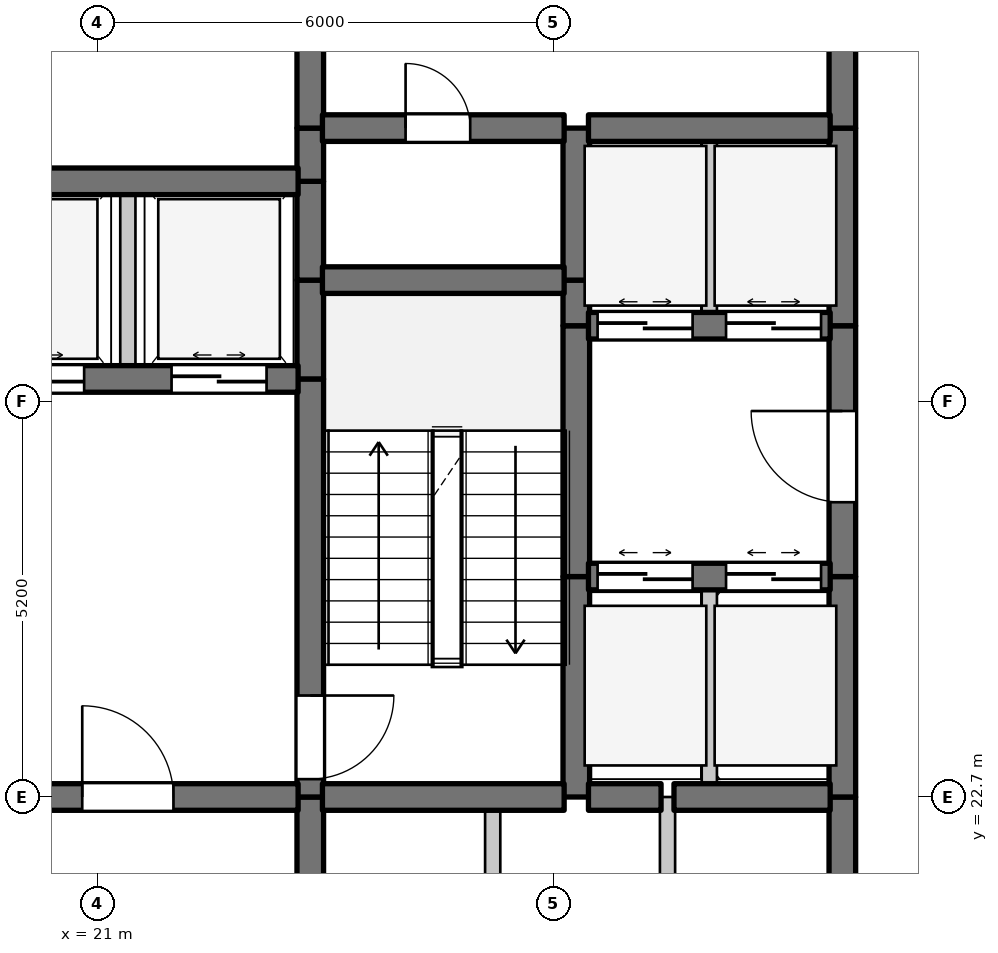
"""IFC4 building model, lengths in metres.
Left out: names, types, materials, properties, quantities, classifications, styles, units other than length and angle.
Written with IfcOpenShell. Run it as: python <this file> out.ifc"""

import sys

from ifc_helpers import new_model, si_unit, direction, frame, frame_2d, origin, place, context, subcontext, project, spatial, rectangle, extrude, element, fill, save


model = new_model("IFC4")
c1 = context("Model", 3, precision=1e-05, world=origin(), true_north=direction((0.0, 1.0)))
c2 = subcontext(c1, "Body", "Model", "MODEL_VIEW")
j1 = project(units=[si_unit("LENGTHUNIT", "METRE"), si_unit("PLANEANGLEUNIT", "RADIAN")], contexts=[c1])
p1 = place(None, origin())
s1 = spatial("IfcSite", under=j1, at=p1, CompositionType="ELEMENT")
p2 = place(p1, origin())
s2 = spatial("IfcBuilding", under=s1, at=p2, CompositionType="ELEMENT")
p3 = place(p2, frame((0.0, 0.0, 86.4)))
s3 = spatial("IfcBuildingStorey", under=s2, at=p3, CompositionType="ELEMENT", Elevation=86.4)
p4 = place(p3, frame((21.4, 28.2, 0.0), z_axis=(0.0, 0.0, 1.0), x_axis=(0.0, 1.0, 0.0)))
e1 = element("IfcWall", 1, at=p4, inside=s3, PredefinedType="STANDARD", context=c2, shape_type="SweptSolid", body=[
    extrude(rectangle(XDim=2.6, YDim=0.2, at=frame_2d((1.3, 0.0))), origin(), (0.0, 0.0, 1.0), 4.185),
])
p5 = place(p3, frame((23.8, 19.5, 0.0), z_axis=(0.0, 0.0, 1.0), x_axis=(0.0, 1.0, 0.0)))
e2 = element("IfcWall", 2, at=p5, inside=s3, PredefinedType="SHEAR", context=c2, shape_type="SweptSolid", body=[
    extrude(rectangle(XDim=3.2, YDim=0.35, at=frame_2d((1.6, 0.0))), origin(), (0.0, 0.0, 1.0), 4.185),
])
p6 = place(p3, frame((23.8, 22.7, 0.0), z_axis=(0.0, 0.0, 1.0), x_axis=(0.0, 1.0, 0.0)))
e3 = element("IfcWall", 3, at=p6, inside=s3, PredefinedType="SHEAR", context=c2, shape_type="SweptSolid", body=[
    extrude(rectangle(XDim=5.5, YDim=0.35, at=frame_2d((2.75, 0.0))), origin(), (0.0, 0.0, 1.0), 4.185),
])
p7 = place(p6, frame((0.235, 0.0, 0.0)))
e4 = element("IfcOpeningElement", 4, at=p7, cuts=e3, PredefinedType="OPENING", context=c2, shape_type="SweptSolid", body=[
    extrude(rectangle(XDim=1.1, YDim=2.15, at=frame_2d((0.55, 1.075))), frame((0.0, 0.185, 0.0), z_axis=(0.0, -1.0, 0.0), x_axis=(1.0, 0.0, 0.0)), (0.0, 0.0, 1.0), 0.37),
])
for number, where, z_axis, x_axis in (
    (5, (23.8, 28.2, 0.0), (0.0, 0.0, 1.0), (0.0, 1.0, 0.0)),
    (6, (23.8, 29.5, 0.0), (0.0, 0.0, 1.0), (0.0, 1.0, 0.0)),
):
    element("IfcWall", number, at=place(p3, frame(where, z_axis=z_axis, x_axis=x_axis)), inside=s3, PredefinedType="SHEAR", context=c2, shape_type="SweptSolid", body=[
        extrude(rectangle(XDim=1.3, YDim=0.35, at=frame_2d((0.65, 0.0))), origin(), (0.0, 0.0, 1.0), 4.185),
    ])
p8 = place(p3, frame((23.8, 30.8, 0.0), z_axis=(0.0, 0.0, 1.0), x_axis=(0.0, 1.0, 0.0)))
e7 = element("IfcWall", 7, at=p8, inside=s3, PredefinedType="SHEAR", context=c2, shape_type="SweptSolid", body=[
    extrude(rectangle(XDim=0.7, YDim=0.35, at=frame_2d((0.35, 0.0))), origin(), (0.0, 0.0, 1.0), 4.185),
])
p9 = place(p3, frame((23.8, 31.5, 0.0), z_axis=(0.0, 0.0, 1.0), x_axis=(0.0, 1.0, 0.0)))
e8 = element("IfcWall", 8, at=p9, inside=s3, PredefinedType="SHEAR", context=c2, shape_type="SweptSolid", body=[
    extrude(rectangle(XDim=3.5, YDim=0.35, at=frame_2d((1.75, 0.0))), origin(), (0.0, 0.0, 1.0), 4.185),
])
p10 = place(p9, frame((1.127, 0.0, 0.0)))
e9 = element("IfcOpeningElement", 9, at=p10, cuts=e8, PredefinedType="OPENING", context=c2, shape_type="SweptSolid", body=[
    extrude(rectangle(XDim=1.1, YDim=2.15, at=frame_2d((0.55, 1.075))), frame((0.0, 0.185, 0.0), z_axis=(0.0, -1.0, 0.0), x_axis=(1.0, 0.0, 0.0)), (0.0, 0.0, 1.0), 0.37),
])
p11 = place(p3, frame((26.2, 19.5, 0.0), z_axis=(0.0, 0.0, 1.0), x_axis=(0.0, 1.0, 0.0)))
e10 = element("IfcWall", 10, at=p11, inside=s3, PredefinedType="STANDARD", context=c2, shape_type="SweptSolid", body=[
    extrude(rectangle(XDim=3.2, YDim=0.2, at=frame_2d((1.6, 0.0))), origin(), (0.0, 0.0, 1.0), 4.185),
])
p12 = place(p3, frame((27.3, 22.7, 0.0), z_axis=(0.0, 0.0, 1.0), x_axis=(0.0, 1.0, 0.0)))
e11 = element("IfcWall", 11, at=p12, inside=s3, PredefinedType="SHEAR", context=c2, shape_type="SweptSolid", body=[
    extrude(rectangle(XDim=2.9, YDim=0.35, at=frame_2d((1.45, 0.0))), origin(), (0.0, 0.0, 1.0), 4.185),
])
p13 = place(p3, frame((27.3, 25.6, 0.0), z_axis=(0.0, 0.0, 1.0), x_axis=(0.0, 1.0, 0.0)))
e12 = element("IfcWall", 12, at=p13, inside=s3, PredefinedType="SHEAR", context=c2, shape_type="SweptSolid", body=[
    extrude(rectangle(XDim=3.3, YDim=0.35, at=frame_2d((1.65, 0.0))), origin(), (0.0, 0.0, 1.0), 4.185),
])
p14 = place(p3, frame((27.3, 28.9, 0.0), z_axis=(0.0, 0.0, 1.0), x_axis=(0.0, 1.0, 0.0)))
e13 = element("IfcWall", 13, at=p14, inside=s3, PredefinedType="SHEAR", context=c2, shape_type="SweptSolid", body=[
    extrude(rectangle(XDim=0.6, YDim=0.35, at=frame_2d((0.3, 0.0))), origin(), (0.0, 0.0, 1.0), 4.185),
])
p15 = place(p3, frame((27.3, 29.5, 0.0), z_axis=(0.0, 0.0, 1.0), x_axis=(0.0, 1.0, 0.0)))
e14 = element("IfcWall", 14, at=p15, inside=s3, PredefinedType="SHEAR", context=c2, shape_type="SweptSolid", body=[
    extrude(rectangle(XDim=2.0, YDim=0.35, at=frame_2d((1.0, 0.0))), origin(), (0.0, 0.0, 1.0), 4.185),
])
p16 = place(p3, frame((28.5, 19.5, 0.0), z_axis=(0.0, 0.0, 1.0), x_axis=(0.0, 1.0, 0.0)))
e15 = element("IfcWall", 15, at=p16, inside=s3, PredefinedType="STANDARD", context=c2, shape_type="SweptSolid", body=[
    extrude(rectangle(XDim=3.2, YDim=0.2, at=frame_2d((1.6, 0.0))), origin(), (0.0, 0.0, 1.0), 4.185),
])
p17 = place(p3, frame((29.05, 22.7, 0.0), z_axis=(0.0, 0.0, 1.0), x_axis=(0.0, 1.0, 0.0)))
e16 = element("IfcWall", 16, at=p17, inside=s3, PredefinedType="STANDARD", context=c2, shape_type="SweptSolid", body=[
    extrude(rectangle(XDim=2.9, YDim=0.2, at=frame_2d((1.45, 0.0))), origin(), (0.0, 0.0, 1.0), 4.185),
])
p18 = place(p3, frame((29.05, 28.9, 0.0), z_axis=(0.0, 0.0, 1.0), x_axis=(0.0, 1.0, 0.0)))
e17 = element("IfcWall", 17, at=p18, inside=s3, PredefinedType="STANDARD", context=c2, shape_type="SweptSolid", body=[
    extrude(rectangle(XDim=2.6, YDim=0.2, at=frame_2d((1.3, 0.0))), origin(), (0.0, 0.0, 1.0), 4.185),
])
p19 = place(p3, frame((30.8, 19.5, 0.0), z_axis=(0.0, 0.0, 1.0), x_axis=(0.0, 1.0, 0.0)))
e18 = element("IfcWall", 18, at=p19, inside=s3, PredefinedType="SHEAR", context=c2, shape_type="SweptSolid", body=[
    extrude(rectangle(XDim=3.2, YDim=0.35, at=frame_2d((1.6, 0.0))), origin(), (0.0, 0.0, 1.0), 4.185),
])
p20 = place(p3, frame((30.8, 22.7, 0.0), z_axis=(0.0, 0.0, 1.0), x_axis=(0.0, 1.0, 0.0)))
e19 = element("IfcWall", 19, at=p20, inside=s3, PredefinedType="SHEAR", context=c2, shape_type="SweptSolid", body=[
    extrude(rectangle(XDim=2.9, YDim=0.35, at=frame_2d((1.45, 0.0))), origin(), (0.0, 0.0, 1.0), 4.185),
])
p21 = place(p3, frame((30.8, 25.6, 0.0), z_axis=(0.0, 0.0, 1.0), x_axis=(0.0, 1.0, 0.0)))
e20 = element("IfcWall", 20, at=p21, inside=s3, PredefinedType="SHEAR", context=c2, shape_type="SweptSolid", body=[
    extrude(rectangle(XDim=3.3, YDim=0.35, at=frame_2d((1.65, 0.0))), origin(), (0.0, 0.0, 1.0), 4.185),
])
p22 = place(p21, frame((0.978, 0.0, 0.0)))
e21 = element("IfcOpeningElement", 21, at=p22, cuts=e20, PredefinedType="OPENING", context=c2, shape_type="SweptSolid", body=[
    extrude(rectangle(XDim=1.2, YDim=2.2, at=frame_2d((0.6, 1.1))), frame((0.0, 0.185, 0.0), z_axis=(0.0, -1.0, 0.0), x_axis=(1.0, 0.0, 0.0)), (0.0, 0.0, 1.0), 0.37),
])
p23 = place(p3, frame((30.8, 28.9, 0.0), z_axis=(0.0, 0.0, 1.0), x_axis=(0.0, 1.0, 0.0)))
e22 = element("IfcWall", 22, at=p23, inside=s3, PredefinedType="SHEAR", context=c2, shape_type="SweptSolid", body=[
    extrude(rectangle(XDim=2.6, YDim=0.35, at=frame_2d((1.3, 0.0))), origin(), (0.0, 0.0, 1.0), 4.185),
])
p24 = place(p3, frame((30.8, 31.5, 0.0), z_axis=(0.0, 0.0, 1.0), x_axis=(0.0, 1.0, 0.0)))
e23 = element("IfcWall", 23, at=p24, inside=s3, PredefinedType="SHEAR", context=c2, shape_type="SweptSolid", body=[
    extrude(rectangle(XDim=3.5, YDim=0.35, at=frame_2d((1.75, 0.0))), origin(), (0.0, 0.0, 1.0), 4.185),
])
p25 = place(p24, frame((1.15, 0.0, 0.0)))
e24 = element("IfcOpeningElement", 24, at=p25, cuts=e23, PredefinedType="OPENING", context=c2, shape_type="SweptSolid", body=[
    extrude(rectangle(XDim=1.2, YDim=2.2, at=frame_2d((0.6, 1.1))), frame((0.0, 0.185, 0.0), z_axis=(0.0, -1.0, 0.0), x_axis=(1.0, 0.0, 0.0)), (0.0, 0.0, 1.0), 0.37),
])
p26 = place(p3, frame((19.16, 22.7, 0.0), z_axis=(0.0, 0.0, 1.0), x_axis=(1.0, 0.0, 0.0)))
e25 = element("IfcWall", 25, at=p26, inside=s3, PredefinedType="SHEAR", context=c2, shape_type="SweptSolid", body=[
    extrude(rectangle(XDim=4.48, YDim=0.35, at=frame_2d((2.24, 0.0))), origin(), (0.0, 0.0, 1.0), 4.185),
])
p27 = place(p26, frame((1.64, 0.0, 0.0)))
e26 = element("IfcOpeningElement", 26, at=p27, cuts=e25, PredefinedType="OPENING", context=c2, shape_type="SweptSolid", body=[
    extrude(rectangle(XDim=1.2, YDim=2.2, at=frame_2d((0.6, 1.1))), frame((0.0, 0.185, 0.0), z_axis=(0.0, -1.0, 0.0), x_axis=(1.0, 0.0, 0.0)), (0.0, 0.0, 1.0), 0.37),
])
p28 = place(p3, frame((23.96, 22.7, 0.0), z_axis=(0.0, 0.0, 1.0), x_axis=(1.0, 0.0, 0.0)))
e27 = element("IfcWall", 27, at=p28, inside=s3, PredefinedType="SHEAR", context=c2, shape_type="SweptSolid", body=[
    extrude(rectangle(XDim=3.18, YDim=0.35, at=frame_2d((1.59, 0.0))), origin(), (0.0, 0.0, 1.0), 4.185),
])
p29 = place(p3, frame((27.46, 22.7, 0.0), z_axis=(0.0, 0.0, 1.0), x_axis=(1.0, 0.0, 0.0)))
e28 = element("IfcWall", 28, at=p29, inside=s3, PredefinedType="SHEAR", context=c2, shape_type="SweptSolid", body=[
    extrude(rectangle(XDim=0.955, YDim=0.35, at=frame_2d((0.478, 0.0))), origin(), (0.0, 0.0, 1.0), 4.185),
])
p30 = place(p3, frame((28.585, 22.7, 0.0), z_axis=(0.0, 0.0, 1.0), x_axis=(1.0, 0.0, 0.0)))
e29 = element("IfcWall", 29, at=p30, inside=s3, PredefinedType="SHEAR", context=c2, shape_type="SweptSolid", body=[
    extrude(rectangle(XDim=2.055, YDim=0.35, at=frame_2d((1.027, 0.0))), origin(), (0.0, 0.0, 1.0), 4.185),
])
p31 = place(p3, frame((27.46, 25.6, 0.0), z_axis=(0.0, 0.0, 1.0), x_axis=(1.0, 0.0, 0.0)))
e30 = element("IfcWall", 30, at=p31, inside=s3, PredefinedType="SHEAR", context=c2, shape_type="SweptSolid", body=[
    extrude(rectangle(XDim=3.18, YDim=0.35, at=frame_2d((1.59, 0.0))), origin(), (0.0, 0.0, 1.0), 4.185),
])
p32 = place(p31, frame((0.12, 0.0, 0.0)))
e31 = element("IfcOpeningElement", 31, at=p32, cuts=e30, PredefinedType="OPENING", context=c2, shape_type="SweptSolid", body=[
    extrude(rectangle(XDim=1.25, YDim=2.2, at=frame_2d((0.625, 1.1))), frame((0.0, 0.185, 0.0), z_axis=(0.0, -1.0, 0.0), x_axis=(1.0, 0.0, 0.0)), (0.0, 0.0, 1.0), 0.37),
])
p33 = place(p31, frame((1.81, 0.0, 0.0)))
e32 = element("IfcOpeningElement", 32, at=p33, cuts=e30, PredefinedType="OPENING", context=c2, shape_type="SweptSolid", body=[
    extrude(rectangle(XDim=1.25, YDim=2.2, at=frame_2d((0.625, 1.1))), frame((0.0, 0.185, 0.0), z_axis=(0.0, -1.0, 0.0), x_axis=(1.0, 0.0, 0.0)), (0.0, 0.0, 1.0), 0.37),
])
p34 = place(p3, frame((19.16, 28.2, 0.0), z_axis=(0.0, 0.0, 1.0), x_axis=(1.0, 0.0, 0.0)))
e33 = element("IfcWall", 33, at=p34, inside=s3, PredefinedType="SHEAR", context=c2, shape_type="SweptSolid", body=[
    extrude(rectangle(XDim=4.48, YDim=0.35, at=frame_2d((2.24, 0.0))), origin(), (0.0, 0.0, 1.0), 4.185),
])
p35 = place(p34, frame((0.415, 0.0, 0.0)))
e34 = element("IfcOpeningElement", 34, at=p35, cuts=e33, PredefinedType="OPENING", context=c2, shape_type="SweptSolid", body=[
    extrude(rectangle(XDim=1.25, YDim=2.2, at=frame_2d((0.625, 1.1))), frame((0.0, 0.185, 0.0), z_axis=(0.0, -1.0, 0.0), x_axis=(1.0, 0.0, 0.0)), (0.0, 0.0, 1.0), 0.37),
])
p36 = place(p34, frame((2.815, 0.0, 0.0)))
e35 = element("IfcOpeningElement", 35, at=p36, cuts=e33, PredefinedType="OPENING", context=c2, shape_type="SweptSolid", body=[
    extrude(rectangle(XDim=1.25, YDim=2.2, at=frame_2d((0.625, 1.1))), frame((0.0, 0.185, 0.0), z_axis=(0.0, -1.0, 0.0), x_axis=(1.0, 0.0, 0.0)), (0.0, 0.0, 1.0), 0.37),
])
p37 = place(p3, frame((27.46, 28.9, 0.0), z_axis=(0.0, 0.0, 1.0), x_axis=(1.0, 0.0, 0.0)))
e36 = element("IfcWall", 36, at=p37, inside=s3, PredefinedType="SHEAR", context=c2, shape_type="SweptSolid", body=[
    extrude(rectangle(XDim=3.18, YDim=0.35, at=frame_2d((1.59, 0.0))), origin(), (0.0, 0.0, 1.0), 4.185),
])
p38 = place(p37, frame((0.12, 0.0, 0.0)))
e37 = element("IfcOpeningElement", 37, at=p38, cuts=e36, PredefinedType="OPENING", context=c2, shape_type="SweptSolid", body=[
    extrude(rectangle(XDim=1.25, YDim=2.2, at=frame_2d((0.625, 1.1))), frame((0.0, 0.185, 0.0), z_axis=(0.0, -1.0, 0.0), x_axis=(1.0, 0.0, 0.0)), (0.0, 0.0, 1.0), 0.37),
])
p39 = place(p37, frame((1.81, 0.0, 0.0)))
e38 = element("IfcOpeningElement", 38, at=p39, cuts=e36, PredefinedType="OPENING", context=c2, shape_type="SweptSolid", body=[
    extrude(rectangle(XDim=1.25, YDim=2.2, at=frame_2d((0.625, 1.1))), frame((0.0, 0.185, 0.0), z_axis=(0.0, -1.0, 0.0), x_axis=(1.0, 0.0, 0.0)), (0.0, 0.0, 1.0), 0.37),
])
p40 = place(p3, frame((23.96, 29.5, 0.0), z_axis=(0.0, 0.0, 1.0), x_axis=(1.0, 0.0, 0.0)))
e39 = element("IfcWall", 39, at=p40, inside=s3, PredefinedType="SHEAR", context=c2, shape_type="SweptSolid", body=[
    extrude(rectangle(XDim=3.18, YDim=0.35, at=frame_2d((1.59, 0.0))), origin(), (0.0, 0.0, 1.0), 4.185),
])
p41 = place(p3, frame((19.16, 30.8, 0.0), z_axis=(0.0, 0.0, 1.0), x_axis=(1.0, 0.0, 0.0)))
e40 = element("IfcWall", 40, at=p41, inside=s3, PredefinedType="SHEAR", context=c2, shape_type="SweptSolid", body=[
    extrude(rectangle(XDim=4.48, YDim=0.35, at=frame_2d((2.24, 0.0))), origin(), (0.0, 0.0, 1.0), 4.185),
])
p42 = place(p3, frame((23.96, 31.5, 0.0), z_axis=(0.0, 0.0, 1.0), x_axis=(1.0, 0.0, 0.0)))
e41 = element("IfcWall", 41, at=p42, inside=s3, PredefinedType="SHEAR", context=c2, shape_type="SweptSolid", body=[
    extrude(rectangle(XDim=3.18, YDim=0.35, at=frame_2d((1.59, 0.0))), origin(), (0.0, 0.0, 1.0), 4.185),
])
p43 = place(p42, frame((1.094, 0.0, 0.0)))
e42 = element("IfcOpeningElement", 42, at=p43, cuts=e41, PredefinedType="OPENING", context=c2, shape_type="SweptSolid", body=[
    extrude(rectangle(XDim=0.85, YDim=2.1, at=frame_2d((0.425, 1.05))), frame((0.0, 0.185, 0.0), z_axis=(0.0, -1.0, 0.0), x_axis=(1.0, 0.0, 0.0)), (0.0, 0.0, 1.0), 0.37),
])
p44 = place(p3, frame((27.46, 31.5, 0.0), z_axis=(0.0, 0.0, 1.0), x_axis=(1.0, 0.0, 0.0)))
e43 = element("IfcWall", 43, at=p44, inside=s3, PredefinedType="SHEAR", context=c2, shape_type="SweptSolid", body=[
    extrude(rectangle(XDim=3.18, YDim=0.35, at=frame_2d((1.59, 0.0))), origin(), (0.0, 0.0, 1.0), 4.185),
])
p45 = place(p7, frame((1.1, 0.0, 0.0), z_axis=(0.0, 0.0, 1.0), x_axis=(-1.0, 0.0, 0.0)))
e44 = element("IfcDoor", 44, at=p45, inside=s3, OperationType="SINGLE_SWING_RIGHT", PredefinedType="DOOR", context=c2, shape_type="SweptSolid", body=[
    extrude(rectangle(XDim=1.1, YDim=2.15, at=frame_2d((0.55, 1.075))), frame((0.0, 0.025, 0.0), z_axis=(0.0, -1.0, 0.0), x_axis=(1.0, 0.0, 0.0)), (0.0, 0.0, 1.0), 0.05),
])
fill(e4, e44)
p46 = place(p22, origin())
e45 = element("IfcDoor", 45, at=p46, inside=s3, OperationType="SINGLE_SWING_RIGHT", PredefinedType="DOOR", context=c2, shape_type="SweptSolid", body=[
    extrude(rectangle(XDim=1.2, YDim=2.2, at=frame_2d((0.6, 1.1))), frame((0.0, 0.025, 0.0), z_axis=(0.0, -1.0, 0.0), x_axis=(1.0, 0.0, 0.0)), (0.0, 0.0, 1.0), 0.05),
])
fill(e21, e45)
p47 = place(p27, origin())
e46 = element("IfcDoor", 46, at=p47, inside=s3, OperationType="SINGLE_SWING_LEFT", PredefinedType="DOOR", context=c2, shape_type="SweptSolid", body=[
    extrude(rectangle(XDim=1.2, YDim=2.2, at=frame_2d((0.6, 1.1))), frame((0.0, 0.025, 0.0), z_axis=(0.0, -1.0, 0.0), x_axis=(1.0, 0.0, 0.0)), (0.0, 0.0, 1.0), 0.05),
])
fill(e26, e46)
p48 = place(p32, origin())
e47 = element("IfcDoor", 47, at=p48, inside=s3, OperationType="DOUBLE_DOOR_SLIDING", PredefinedType="DOOR", context=c2, shape_type="SweptSolid", body=[
    extrude(rectangle(XDim=1.25, YDim=2.2, at=frame_2d((0.625, 1.1))), frame((0.0, 0.025, 0.0), z_axis=(0.0, -1.0, 0.0), x_axis=(1.0, 0.0, 0.0)), (0.0, 0.0, 1.0), 0.05),
])
fill(e31, e47)
p49 = place(p33, origin())
e48 = element("IfcDoor", 48, at=p49, inside=s3, OperationType="DOUBLE_DOOR_SLIDING", PredefinedType="DOOR", context=c2, shape_type="SweptSolid", body=[
    extrude(rectangle(XDim=1.25, YDim=2.2, at=frame_2d((0.625, 1.1))), frame((0.0, 0.025, 0.0), z_axis=(0.0, -1.0, 0.0), x_axis=(1.0, 0.0, 0.0)), (0.0, 0.0, 1.0), 0.05),
])
fill(e32, e48)
p50 = place(p35, origin())
e49 = element("IfcDoor", 49, at=p50, inside=s3, OperationType="DOUBLE_DOOR_SLIDING", PredefinedType="DOOR", context=c2, shape_type="SweptSolid", body=[
    extrude(rectangle(XDim=1.25, YDim=2.2, at=frame_2d((0.625, 1.1))), frame((0.0, 0.025, 0.0), z_axis=(0.0, -1.0, 0.0), x_axis=(1.0, 0.0, 0.0)), (0.0, 0.0, 1.0), 0.05),
])
fill(e34, e49)
p51 = place(p36, origin())
e50 = element("IfcDoor", 50, at=p51, inside=s3, OperationType="DOUBLE_DOOR_SLIDING", PredefinedType="DOOR", context=c2, shape_type="SweptSolid", body=[
    extrude(rectangle(XDim=1.25, YDim=2.2, at=frame_2d((0.625, 1.1))), frame((0.0, 0.025, 0.0), z_axis=(0.0, -1.0, 0.0), x_axis=(1.0, 0.0, 0.0)), (0.0, 0.0, 1.0), 0.05),
])
fill(e35, e50)
p52 = place(p38, origin())
e51 = element("IfcDoor", 51, at=p52, inside=s3, OperationType="DOUBLE_DOOR_SLIDING", PredefinedType="DOOR", context=c2, shape_type="SweptSolid", body=[
    extrude(rectangle(XDim=1.25, YDim=2.2, at=frame_2d((0.625, 1.1))), frame((0.0, 0.025, 0.0), z_axis=(0.0, -1.0, 0.0), x_axis=(1.0, 0.0, 0.0)), (0.0, 0.0, 1.0), 0.05),
])
fill(e37, e51)
p53 = place(p39, origin())
e52 = element("IfcDoor", 52, at=p53, inside=s3, OperationType="DOUBLE_DOOR_SLIDING", PredefinedType="DOOR", context=c2, shape_type="SweptSolid", body=[
    extrude(rectangle(XDim=1.25, YDim=2.2, at=frame_2d((0.625, 1.1))), frame((0.0, 0.025, 0.0), z_axis=(0.0, -1.0, 0.0), x_axis=(1.0, 0.0, 0.0)), (0.0, 0.0, 1.0), 0.05),
])
fill(e38, e52)
p54 = place(p43, origin())
e53 = element("IfcDoor", 53, at=p54, inside=s3, OperationType="SINGLE_SWING_LEFT", PredefinedType="DOOR", context=c2, shape_type="SweptSolid", body=[
    extrude(rectangle(XDim=0.85, YDim=2.1, at=frame_2d((0.425, 1.05))), frame((0.0, 0.025, 0.0), z_axis=(0.0, -1.0, 0.0), x_axis=(1.0, 0.0, 0.0)), (0.0, 0.0, 1.0), 0.05),
])
fill(e42, e53)
save(model, sys.argv[1])
